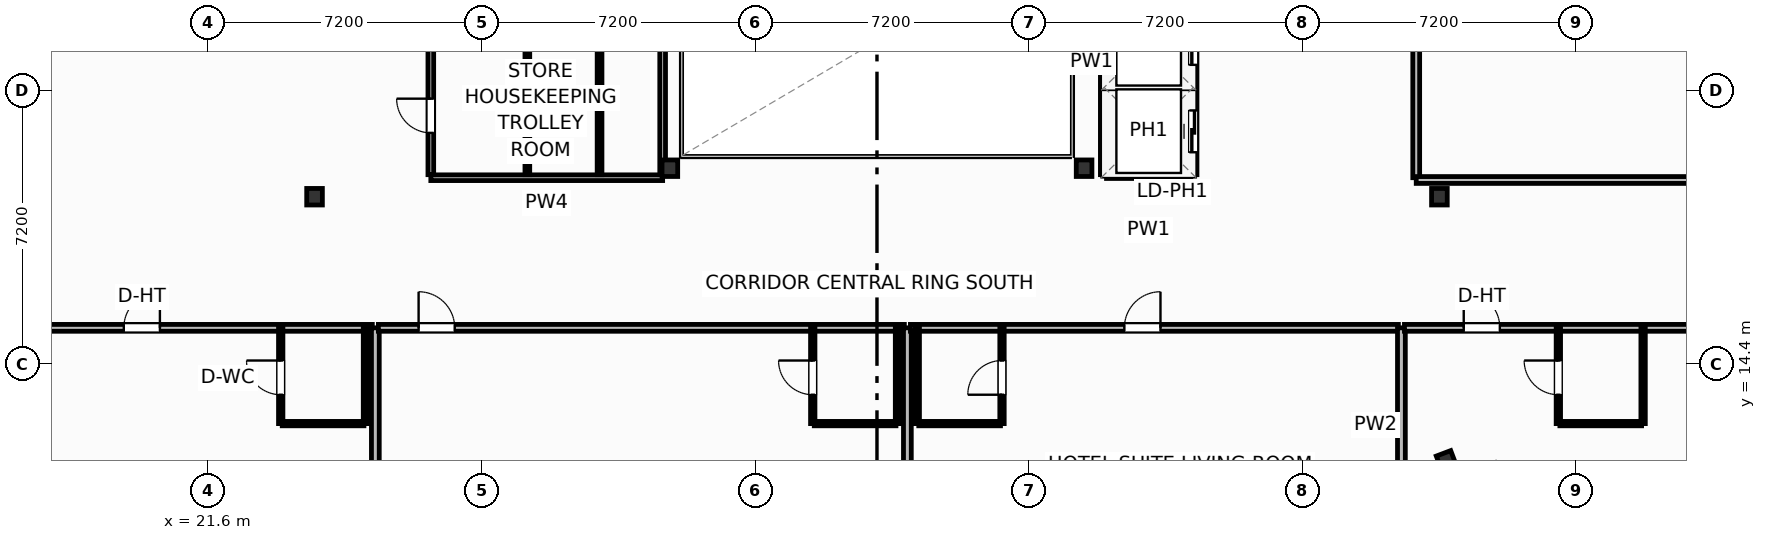
"""IFC4 building model, lengths in metres.
Left out: names, types, materials, properties, quantities, classifications, styles, units other than length and angle.
Written with IfcOpenShell. Run it as: python <this file> out.ifc"""

import sys

from ifc_helpers import new_model, si_unit, direction, frame, frame_2d, origin, origin_2d, place, context, subcontext, project, spatial, rectangle, i_section, extrude, element, fill, save


model = new_model("IFC4")
c1 = context("Model", 3, precision=1e-05, world=origin(), true_north=direction((0.0, 1.0)))
c2 = subcontext(c1, "Body", "Model", "MODEL_VIEW")
j1 = project(units=[si_unit("LENGTHUNIT", "METRE"), si_unit("PLANEANGLEUNIT", "RADIAN")], contexts=[c1])
p1 = place(None, origin())
s1 = spatial("IfcSite", under=j1, at=p1, CompositionType="ELEMENT")
p2 = place(p1, origin())
s2 = spatial("IfcBuilding", under=s1, at=p2, CompositionType="ELEMENT")
p3 = place(p2, frame((0.0, 0.0, 249.7)))
s3 = spatial("IfcBuildingStorey", under=s2, at=p3, CompositionType="ELEMENT", Elevation=249.7)
for number, where, z_axis, x_axis in (
    (1, (33.75, 19.55, 0.0), (0.0, 0.0, 1.0), (1.0, 0.0, 0.0)),
    (2, (44.65, 19.55, 0.0), (0.0, 0.0, 1.0), (1.0, 0.0, 0.0)),
    (3, (24.4, 18.8, 0.0), (0.0, 0.0, 1.0), (1.0, 0.0, 0.0)),
    (4, (54.0, 18.8, 0.0), (0.0, 0.0, 1.0), (1.0, 0.0, 0.0)),
):
    element("IfcColumn", number, at=place(p3, frame(where, z_axis=z_axis, x_axis=x_axis)), inside=s3, PredefinedType="COLUMN", context=c2, shape_type="SweptSolid", body=[
        extrude(i_section(OverallWidth=0.412, OverallDepth=0.435, WebThickness=0.036, FlangeThickness=0.057, FilletRadius=0.025, at=origin_2d()), origin(), (0.0, 0.0, 1.0), 3.7),
    ])
p4 = place(p3, frame((54.181, 11.853, 0.0), z_axis=(0.0, 0.0, 1.0), x_axis=(0.935221751401, 0.354062530786, 0.0)))
e5 = element("IfcColumn", 5, at=p4, inside=s3, PredefinedType="COLUMN", context=c2, shape_type="SweptSolid", body=[
    extrude(i_section(OverallWidth=0.406, OverallDepth=0.416, WebThickness=0.03, FlangeThickness=0.048, FilletRadius=0.025, at=origin_2d()), origin(), (0.0, 0.0, 1.0), 3.7),
])
p5 = place(p3, frame((56.219, 9.845, 0.0), z_axis=(0.0, 0.0, 1.0), x_axis=(0.935225601791, 0.354052360188, 0.0)))
e6 = element("IfcWall", 6, at=p5, inside=s3, PredefinedType="SOLIDWALL", context=c2, shape_type="SweptSolid", body=[
    extrude(rectangle(XDim=17.647, YDim=0.22, at=frame_2d((8.824, 0.0))), origin(), (0.0, 0.0, 1.0), 2.66),
])
p6 = place(p5, frame((7.774, 0.0, 0.8)))
e7 = element("IfcOpeningElement", 7, at=p6, cuts=e6, PredefinedType="OPENING", context=c2, shape_type="SweptSolid", body=[
    extrude(rectangle(XDim=2.1, YDim=1.75, at=frame_2d((1.05, 0.875))), frame((0.0, 0.12, 0.0), z_axis=(0.0, -1.0, 0.0), x_axis=(1.0, 0.0, 0.0)), (0.0, 0.0, 1.0), 0.24),
])
p7 = place(p3, frame((7.764, 15.35, 0.0), z_axis=(0.0, 0.0, 1.0), x_axis=(1.0, 0.0, 0.0)))
e8 = element("IfcWall", 8, at=p7, inside=s3, PredefinedType="PARTITIONING", context=c2, shape_type="SweptSolid", body=[
    extrude(rectangle(XDim=18.156, YDim=0.18, at=frame_2d((9.078, 0.0))), origin(), (0.0, 0.0, 1.0), 3.38),
])
p8 = place(p7, frame((11.617, 0.0, 0.0)))
e9 = element("IfcOpeningElement", 9, at=p8, cuts=e8, PredefinedType="OPENING", context=c2, shape_type="SweptSolid", body=[
    extrude(rectangle(XDim=0.95, YDim=2.15, at=frame_2d((0.475, 1.075))), frame((0.0, 0.1, 0.0), z_axis=(0.0, -1.0, 0.0), x_axis=(1.0, 0.0, 0.0)), (0.0, 0.0, 1.0), 0.2),
])
p9 = place(p3, frame((23.55, 12.83, 0.0), z_axis=(0.0, 0.0, 1.0), x_axis=(1.0, 0.0, 0.0)))
e10 = element("IfcWall", 10, at=p9, inside=s3, PredefinedType="PARTITIONING", context=c2, shape_type="SweptSolid", body=[
    extrude(rectangle(XDim=2.15, YDim=0.115, at=frame_2d((1.075, 0.0))), origin(), (0.0, 0.0, 1.0), 3.38),
])
p10 = place(p3, frame((23.51, 12.83, 0.0), z_axis=(0.0, 0.0, 1.0), x_axis=(0.0, 1.0, 0.0)))
e11 = element("IfcWall", 11, at=p10, inside=s3, PredefinedType="PARTITIONING", context=c2, shape_type="SweptSolid", body=[
    extrude(rectangle(XDim=2.52, YDim=0.115, at=frame_2d((1.26, 0.0))), origin(), (0.0, 0.0, 1.0), 3.38),
])
p11 = place(p10, frame((0.76, 0.0, 0.0)))
e12 = element("IfcOpeningElement", 12, at=p11, cuts=e11, PredefinedType="OPENING", context=c2, shape_type="SweptSolid", body=[
    extrude(rectangle(XDim=0.9, YDim=2.05, at=frame_2d((0.45, 1.025))), frame((0.0, 0.067, 0.0), z_axis=(0.0, -1.0, 0.0), x_axis=(1.0, 0.0, 0.0)), (0.0, 0.0, 1.0), 0.135),
])
p12 = place(p3, frame((25.74, 12.83, 0.0), z_axis=(0.0, 0.0, 1.0), x_axis=(0.0, 1.0, 0.0)))
e13 = element("IfcWall", 13, at=p12, inside=s3, PredefinedType="PARTITIONING", context=c2, shape_type="SweptSolid", body=[
    extrude(rectangle(XDim=2.52, YDim=0.115, at=frame_2d((1.26, 0.0))), origin(), (0.0, 0.0, 1.0), 1.165),
])
p13 = place(p3, frame((26.0, -1.574, 0.0), z_axis=(0.0, 0.0, 1.0), x_axis=(0.0, 1.0, 0.0)))
e14 = element("IfcWall", 14, at=p13, inside=s3, PredefinedType="PARTITIONING", context=c2, shape_type="SweptSolid", body=[
    extrude(rectangle(XDim=16.925, YDim=0.205, at=frame_2d((8.462, 0.0))), origin(), (0.0, 0.0, 1.0), 1.165),
])
p14 = place(p3, frame((26.08, 15.35, 0.0), z_axis=(0.0, 0.0, 1.0), x_axis=(1.0, 0.0, 0.0)))
e15 = element("IfcWall", 15, at=p14, inside=s3, PredefinedType="PARTITIONING", context=c2, shape_type="SweptSolid", body=[
    extrude(rectangle(XDim=13.84, YDim=0.18, at=frame_2d((6.92, 0.0))), origin(), (0.0, 0.0, 1.0), 3.38),
])
p15 = place(p14, frame((1.058, 0.0, 0.0)))
e16 = element("IfcOpeningElement", 16, at=p15, cuts=e15, PredefinedType="OPENING", context=c2, shape_type="SweptSolid", body=[
    extrude(rectangle(XDim=0.95, YDim=2.15, at=frame_2d((0.475, 1.075))), frame((0.0, 0.1, 0.0), z_axis=(0.0, -1.0, 0.0), x_axis=(1.0, 0.0, 0.0)), (0.0, 0.0, 1.0), 0.2),
])
p16 = place(p3, frame((37.55, 12.83, 0.0), z_axis=(0.0, 0.0, 1.0), x_axis=(1.0, 0.0, 0.0)))
e17 = element("IfcWall", 17, at=p16, inside=s3, PredefinedType="PARTITIONING", context=c2, shape_type="SweptSolid", body=[
    extrude(rectangle(XDim=2.15, YDim=0.115, at=frame_2d((1.075, 0.0))), origin(), (0.0, 0.0, 1.0), 3.38),
])
p17 = place(p3, frame((37.51, 12.83, 0.0), z_axis=(0.0, 0.0, 1.0), x_axis=(0.0, 1.0, 0.0)))
e18 = element("IfcWall", 18, at=p17, inside=s3, PredefinedType="PARTITIONING", context=c2, shape_type="SweptSolid", body=[
    extrude(rectangle(XDim=2.52, YDim=0.115, at=frame_2d((1.26, 0.0))), origin(), (0.0, 0.0, 1.0), 3.38),
])
p18 = place(p17, frame((0.76, 0.0, 0.0)))
e19 = element("IfcOpeningElement", 19, at=p18, cuts=e18, PredefinedType="OPENING", context=c2, shape_type="SweptSolid", body=[
    extrude(rectangle(XDim=0.9, YDim=2.05, at=frame_2d((0.45, 1.025))), frame((0.0, 0.067, 0.0), z_axis=(0.0, -1.0, 0.0), x_axis=(1.0, 0.0, 0.0)), (0.0, 0.0, 1.0), 0.135),
])
p19 = place(p3, frame((39.74, 12.83, 0.0), z_axis=(0.0, 0.0, 1.0), x_axis=(0.0, 1.0, 0.0)))
e20 = element("IfcWall", 20, at=p19, inside=s3, PredefinedType="PARTITIONING", context=c2, shape_type="SweptSolid", body=[
    extrude(rectangle(XDim=2.52, YDim=0.115, at=frame_2d((1.26, 0.0))), origin(), (0.0, 0.0, 1.0), 3.38),
])
p20 = place(p3, frame((40.0, 5.338, 0.0), z_axis=(0.0, 0.0, 1.0), x_axis=(0.0, 1.0, 0.0)))
e21 = element("IfcWall", 21, at=p20, inside=s3, PredefinedType="PARTITIONING", context=c2, shape_type="SweptSolid", body=[
    extrude(rectangle(XDim=10.012, YDim=0.205, at=frame_2d((5.006, 0.0))), origin(), (0.0, 0.0, 1.0), 3.38),
])
p21 = place(p3, frame((40.08, 15.35, 0.0), z_axis=(0.0, 0.0, 1.0), x_axis=(1.0, 0.0, 0.0)))
e22 = element("IfcWall", 22, at=p21, inside=s3, PredefinedType="PARTITIONING", context=c2, shape_type="SweptSolid", body=[
    extrude(rectangle(XDim=12.84, YDim=0.18, at=frame_2d((6.42, 0.0))), origin(), (0.0, 0.0, 1.0), 3.38),
])
p22 = place(p21, frame((5.63, 0.0, 0.0)))
e23 = element("IfcOpeningElement", 23, at=p22, cuts=e22, PredefinedType="OPENING", context=c2, shape_type="SweptSolid", body=[
    extrude(rectangle(XDim=0.95, YDim=2.15, at=frame_2d((0.475, 1.075))), frame((0.0, 0.1, 0.0), z_axis=(0.0, -1.0, 0.0), x_axis=(1.0, 0.0, 0.0)), (0.0, 0.0, 1.0), 0.2),
])
p23 = place(p3, frame((40.3, 12.83, 0.0), z_axis=(0.0, 0.0, 1.0), x_axis=(1.0, 0.0, 0.0)))
e24 = element("IfcWall", 24, at=p23, inside=s3, PredefinedType="PARTITIONING", context=c2, shape_type="SweptSolid", body=[
    extrude(rectangle(XDim=2.15, YDim=0.115, at=frame_2d((1.075, 0.0))), origin(), (0.0, 0.0, 1.0), 3.38),
])
p24 = place(p3, frame((42.49, 12.83, 0.0), z_axis=(0.0, 0.0, 1.0), x_axis=(0.0, 1.0, 0.0)))
e25 = element("IfcWall", 25, at=p24, inside=s3, PredefinedType="PARTITIONING", context=c2, shape_type="SweptSolid", body=[
    extrude(rectangle(XDim=2.52, YDim=0.115, at=frame_2d((1.26, 0.0))), origin(), (0.0, 0.0, 1.0), 3.38),
])
p25 = place(p24, frame((0.76, 0.0, 0.0)))
e26 = element("IfcOpeningElement", 26, at=p25, cuts=e25, PredefinedType="OPENING", context=c2, shape_type="SweptSolid", body=[
    extrude(rectangle(XDim=0.9, YDim=2.05, at=frame_2d((0.45, 1.025))), frame((0.0, 0.067, 0.0), z_axis=(0.0, -1.0, 0.0), x_axis=(1.0, 0.0, 0.0)), (0.0, 0.0, 1.0), 0.135),
])
p26 = place(p3, frame((40.26, 12.83, 0.0), z_axis=(0.0, 0.0, 1.0), x_axis=(0.0, 1.0, 0.0)))
e27 = element("IfcWall", 27, at=p26, inside=s3, PredefinedType="PARTITIONING", context=c2, shape_type="SweptSolid", body=[
    extrude(rectangle(XDim=2.52, YDim=0.115, at=frame_2d((1.26, 0.0))), origin(), (0.0, 0.0, 1.0), 3.38),
])
p27 = place(p3, frame((53.0, 10.26, 0.0), z_axis=(0.0, 0.0, 1.0), x_axis=(0.0, 1.0, 0.0)))
e28 = element("IfcWall", 28, at=p27, inside=s3, PredefinedType="PARTITIONING", context=c2, shape_type="SweptSolid", body=[
    extrude(rectangle(XDim=5.09, YDim=0.205, at=frame_2d((2.545, 0.0))), origin(), (0.0, 0.0, 1.0), 3.38),
])
p28 = place(p3, frame((53.08, 15.35, 0.0), z_axis=(0.0, 0.0, 1.0), x_axis=(1.0, 0.0, 0.0)))
e29 = element("IfcWall", 29, at=p28, inside=s3, PredefinedType="PARTITIONING", context=c2, shape_type="SweptSolid", body=[
    extrude(rectangle(XDim=17.624, YDim=0.18, at=frame_2d((8.812, 0.0))), origin(), (0.0, 0.0, 1.0), 3.38),
])
p29 = place(p28, frame((1.56, 0.0, 0.0)))
e30 = element("IfcOpeningElement", 30, at=p29, cuts=e29, PredefinedType="OPENING", context=c2, shape_type="SweptSolid", body=[
    extrude(rectangle(XDim=0.95, YDim=2.15, at=frame_2d((0.475, 1.075))), frame((0.0, 0.1, 0.0), z_axis=(0.0, -1.0, 0.0), x_axis=(1.0, 0.0, 0.0)), (0.0, 0.0, 1.0), 0.2),
])
p30 = place(p3, frame((57.17, 12.83, 0.0), z_axis=(0.0, 0.0, 1.0), x_axis=(1.0, 0.0, 0.0)))
e31 = element("IfcWall", 31, at=p30, inside=s3, PredefinedType="PARTITIONING", context=c2, shape_type="SweptSolid", body=[
    extrude(rectangle(XDim=2.15, YDim=0.115, at=frame_2d((1.075, 0.0))), origin(), (0.0, 0.0, 1.0), 3.38),
])
p31 = place(p3, frame((57.13, 12.83, 0.0), z_axis=(0.0, 0.0, 1.0), x_axis=(0.0, 1.0, 0.0)))
e32 = element("IfcWall", 32, at=p31, inside=s3, PredefinedType="PARTITIONING", context=c2, shape_type="SweptSolid", body=[
    extrude(rectangle(XDim=2.52, YDim=0.115, at=frame_2d((1.26, 0.0))), origin(), (0.0, 0.0, 1.0), 3.38),
])
p32 = place(p31, frame((0.76, 0.0, 0.0)))
e33 = element("IfcOpeningElement", 33, at=p32, cuts=e32, PredefinedType="OPENING", context=c2, shape_type="SweptSolid", body=[
    extrude(rectangle(XDim=0.9, YDim=2.05, at=frame_2d((0.45, 1.025))), frame((0.0, 0.067, 0.0), z_axis=(0.0, -1.0, 0.0), x_axis=(1.0, 0.0, 0.0)), (0.0, 0.0, 1.0), 0.135),
])
p33 = place(p3, frame((59.36, 12.83, 0.0), z_axis=(0.0, 0.0, 1.0), x_axis=(0.0, 1.0, 0.0)))
e34 = element("IfcWall", 34, at=p33, inside=s3, PredefinedType="PARTITIONING", context=c2, shape_type="SweptSolid", body=[
    extrude(rectangle(XDim=2.52, YDim=0.115, at=frame_2d((1.26, 0.0))), origin(), (0.0, 0.0, 1.0), 3.38),
])
p34 = place(p3, frame((53.39, 19.3, 0.0), z_axis=(0.0, 0.0, 1.0), x_axis=(0.0, 1.0, 0.0)))
e35 = element("IfcWall", 35, at=p34, inside=s3, PredefinedType="PARTITIONING", context=c2, shape_type="SweptSolid", body=[
    extrude(rectangle(XDim=8.07, YDim=0.18, at=frame_2d((4.035, 0.0))), origin(), (0.0, 0.0, 1.0), 3.38),
])
p35 = place(p34, frame((6.8, 0.0, 0.0)))
e36 = element("IfcOpeningElement", 36, at=p35, cuts=e35, PredefinedType="OPENING", context=c2, shape_type="SweptSolid", body=[
    extrude(rectangle(XDim=0.92, YDim=2.05, at=frame_2d((0.46, 1.025))), frame((0.0, 0.1, 0.0), z_axis=(0.0, -1.0, 0.0), x_axis=(1.0, 0.0, 0.0)), (0.0, 0.0, 1.0), 0.2),
])
p36 = place(p3, frame((53.39, 19.24, 0.0), z_axis=(0.0, 0.0, 1.0), x_axis=(1.0, 0.0, 0.0)))
e37 = element("IfcWall", 37, at=p36, inside=s3, PredefinedType="PARTITIONING", context=c2, shape_type="SweptSolid", body=[
    extrude(rectangle(XDim=22.217, YDim=0.18, at=frame_2d((11.108, 0.0))), origin(), (0.0, 0.0, 1.0), 1.165),
])
p37 = place(p3, frame((27.46, 19.3, 0.0), z_axis=(0.0, 0.0, 1.0), x_axis=(1.0, 0.0, 0.0)))
e38 = element("IfcWall", 38, at=p37, inside=s3, PredefinedType="PARTITIONING", context=c2, shape_type="SweptSolid", body=[
    extrude(rectangle(XDim=6.1, YDim=0.15, at=frame_2d((3.05, 0.0))), origin(), (0.0, 0.0, 1.0), 2.592),
])
for number, where, z_axis, x_axis in (
    (39, (30.0, 19.38, 0.0), (0.0, 0.0, 1.0), (0.0, 1.0, 0.0)),
    (40, (31.9, 19.38, 0.0), (0.0, 0.0, 1.0), (0.0, 1.0, 0.0)),
):
    element("IfcWall", number, at=place(p3, frame(where, z_axis=z_axis, x_axis=x_axis)), inside=s3, PredefinedType="PARTITIONING", context=c2, shape_type="SweptSolid", body=[
        extrude(rectangle(XDim=3.82, YDim=0.125, at=frame_2d((1.91, 0.0))), origin(), (0.0, 0.0, 1.0), 3.38),
    ])
p38 = place(p3, frame((27.46, 19.38, 0.0), z_axis=(0.0, 0.0, 1.0), x_axis=(0.0, 1.0, 0.0)))
e41 = element("IfcWall", 41, at=p38, inside=s3, PredefinedType="PARTITIONING", context=c2, shape_type="SweptSolid", body=[
    extrude(rectangle(XDim=7.16, YDim=0.15, at=frame_2d((3.58, 0.0))), origin(), (0.0, 0.0, 1.0), 3.38),
])
p39 = place(p38, frame((1.1, 0.0, 0.0)))
e42 = element("IfcOpeningElement", 42, at=p39, cuts=e41, PredefinedType="OPENING", context=c2, shape_type="SweptSolid", body=[
    extrude(rectangle(XDim=0.9, YDim=2.05, at=frame_2d((0.45, 1.025))), frame((0.0, 0.085, 0.0), z_axis=(0.0, -1.0, 0.0), x_axis=(1.0, 0.0, 0.0)), (0.0, 0.0, 1.0), 0.17),
])
p40 = place(p3, frame((33.56, 19.38, 0.0), z_axis=(0.0, 0.0, 1.0), x_axis=(0.0, 1.0, 0.0)))
e43 = element("IfcWall", 43, at=p40, inside=s3, PredefinedType="PARTITIONING", context=c2, shape_type="SweptSolid", body=[
    extrude(rectangle(XDim=7.16, YDim=0.15, at=frame_2d((3.58, 0.0))), origin(), (0.0, 0.0, 1.0), 2.754),
])
p41 = place(p3, frame((45.24, 21.675, 0.0), z_axis=(0.0, 0.0, 1.0), x_axis=(1.0, 0.0, 0.0)))
e44 = element("IfcWall", 44, at=p41, inside=s3, PredefinedType="PARTITIONING", context=c2, shape_type="SweptSolid", body=[
    extrude(rectangle(XDim=2.22, YDim=0.2, at=frame_2d((1.11, 0.0))), origin(), (0.0, 0.0, 1.0), 3.38),
])
p42 = place(p3, frame((45.24, 19.38, 0.0), z_axis=(0.0, 0.0, 1.0), x_axis=(1.0, 0.0, 0.0)))
e45 = element("IfcWall", 45, at=p42, inside=s3, PredefinedType="PARTITIONING", context=c2, shape_type="SweptSolid", body=[
    extrude(rectangle(XDim=2.22, YDim=0.2, at=frame_2d((1.11, 0.0))), origin(), (0.0, 0.0, 1.0), 2.592),
])
p43 = place(p3, frame((45.18, 19.38, 0.0), z_axis=(0.0, 0.0, 1.0), x_axis=(0.0, 1.0, 0.0)))
e46 = element("IfcWall", 46, at=p43, inside=s3, PredefinedType="PARTITIONING", context=c2, shape_type="SweptSolid", body=[
    extrude(rectangle(XDim=6.9, YDim=0.2, at=frame_2d((3.45, 0.0))), origin(), (0.0, 0.0, 1.0), 3.38),
])
p44 = place(p3, frame((47.52, 19.38, 0.0), z_axis=(0.0, 0.0, 1.0), x_axis=(0.0, 1.0, 0.0)))
e47 = element("IfcWall", 47, at=p44, inside=s3, PredefinedType="PARTITIONING", context=c2, shape_type="SweptSolid", body=[
    extrude(rectangle(XDim=6.9, YDim=0.2, at=frame_2d((3.45, 0.0))), origin(), (0.0, 0.0, 1.0), 3.38),
])
p45 = place(p44, frame((0.59, 0.0, 0.0)))
e48 = element("IfcOpeningElement", 48, at=p45, cuts=e47, PredefinedType="OPENING", context=c2, shape_type="SweptSolid", body=[
    extrude(rectangle(XDim=1.1, YDim=2.15, at=frame_2d((0.55, 1.075))), frame((0.0, 0.11, 0.0), z_axis=(0.0, -1.0, 0.0), x_axis=(1.0, 0.0, 0.0)), (0.0, 0.0, 1.0), 0.22),
])
p46 = place(p44, frame((2.89, 0.0, 0.0)))
e49 = element("IfcOpeningElement", 49, at=p46, cuts=e47, PredefinedType="OPENING", context=c2, shape_type="SweptSolid", body=[
    extrude(rectangle(XDim=1.1, YDim=2.15, at=frame_2d((0.55, 1.075))), frame((0.0, 0.11, 0.0), z_axis=(0.0, -1.0, 0.0), x_axis=(1.0, 0.0, 0.0)), (0.0, 0.0, 1.0), 0.22),
])
p47 = place(p44, frame((5.19, 0.0, 0.0)))
e50 = element("IfcOpeningElement", 50, at=p47, cuts=e47, PredefinedType="OPENING", context=c2, shape_type="SweptSolid", body=[
    extrude(rectangle(XDim=1.1, YDim=2.15, at=frame_2d((0.55, 1.075))), frame((0.0, 0.11, 0.0), z_axis=(0.0, -1.0, 0.0), x_axis=(1.0, 0.0, 0.0)), (0.0, 0.0, 1.0), 0.22),
])
p48 = place(p8, origin())
e51 = element("IfcDoor", 51, at=p48, inside=s3, OperationType="SINGLE_SWING_RIGHT", PredefinedType="DOOR", context=c2, shape_type="SweptSolid", body=[
    extrude(rectangle(XDim=0.95, YDim=2.15, at=frame_2d((0.475, 1.075))), frame((0.0, 0.025, 0.0), z_axis=(0.0, -1.0, 0.0), x_axis=(1.0, 0.0, 0.0)), (0.0, 0.0, 1.0), 0.05),
])
fill(e9, e51)
p49 = place(p11, origin())
e52 = element("IfcDoor", 52, at=p49, inside=s3, OperationType="SINGLE_SWING_RIGHT", PredefinedType="DOOR", context=c2, shape_type="SweptSolid", body=[
    extrude(rectangle(XDim=0.9, YDim=2.05, at=frame_2d((0.45, 1.025))), frame((0.0, 0.025, 0.0), z_axis=(0.0, -1.0, 0.0), x_axis=(1.0, 0.0, 0.0)), (0.0, 0.0, 1.0), 0.05),
])
fill(e12, e52)
p50 = place(p15, origin())
e53 = element("IfcDoor", 53, at=p50, inside=s3, OperationType="SINGLE_SWING_LEFT", PredefinedType="DOOR", context=c2, shape_type="SweptSolid", body=[
    extrude(rectangle(XDim=0.95, YDim=2.15, at=frame_2d((0.475, 1.075))), frame((0.0, 0.025, 0.0), z_axis=(0.0, -1.0, 0.0), x_axis=(1.0, 0.0, 0.0)), (0.0, 0.0, 1.0), 0.05),
])
fill(e16, e53)
p51 = place(p18, origin())
e54 = element("IfcDoor", 54, at=p51, inside=s3, OperationType="SINGLE_SWING_RIGHT", PredefinedType="DOOR", context=c2, shape_type="SweptSolid", body=[
    extrude(rectangle(XDim=0.9, YDim=2.05, at=frame_2d((0.45, 1.025))), frame((0.0, 0.025, 0.0), z_axis=(0.0, -1.0, 0.0), x_axis=(1.0, 0.0, 0.0)), (0.0, 0.0, 1.0), 0.05),
])
fill(e19, e54)
p52 = place(p22, origin())
e55 = element("IfcDoor", 55, at=p52, inside=s3, OperationType="SINGLE_SWING_RIGHT", PredefinedType="DOOR", context=c2, shape_type="SweptSolid", body=[
    extrude(rectangle(XDim=0.95, YDim=2.15, at=frame_2d((0.475, 1.075))), frame((0.0, 0.025, 0.0), z_axis=(0.0, -1.0, 0.0), x_axis=(1.0, 0.0, 0.0)), (0.0, 0.0, 1.0), 0.05),
])
fill(e23, e55)
p53 = place(p25, origin())
e56 = element("IfcDoor", 56, at=p53, inside=s3, OperationType="SINGLE_SWING_LEFT", PredefinedType="DOOR", context=c2, shape_type="SweptSolid", body=[
    extrude(rectangle(XDim=0.9, YDim=2.05, at=frame_2d((0.45, 1.025))), frame((0.0, 0.025, 0.0), z_axis=(0.0, -1.0, 0.0), x_axis=(1.0, 0.0, 0.0)), (0.0, 0.0, 1.0), 0.05),
])
fill(e26, e56)
p54 = place(p29, origin())
e57 = element("IfcDoor", 57, at=p54, inside=s3, OperationType="SINGLE_SWING_LEFT", PredefinedType="DOOR", context=c2, shape_type="SweptSolid", body=[
    extrude(rectangle(XDim=0.95, YDim=2.15, at=frame_2d((0.475, 1.075))), frame((0.0, 0.025, 0.0), z_axis=(0.0, -1.0, 0.0), x_axis=(1.0, 0.0, 0.0)), (0.0, 0.0, 1.0), 0.05),
])
fill(e30, e57)
p55 = place(p32, origin())
e58 = element("IfcDoor", 58, at=p55, inside=s3, OperationType="SINGLE_SWING_RIGHT", PredefinedType="DOOR", context=c2, shape_type="SweptSolid", body=[
    extrude(rectangle(XDim=0.9, YDim=2.05, at=frame_2d((0.45, 1.025))), frame((0.0, 0.025, 0.0), z_axis=(0.0, -1.0, 0.0), x_axis=(1.0, 0.0, 0.0)), (0.0, 0.0, 1.0), 0.05),
])
fill(e33, e58)
p56 = place(p39, origin())
e59 = element("IfcDoor", 59, at=p56, inside=s3, OperationType="SINGLE_SWING_RIGHT", PredefinedType="DOOR", context=c2, shape_type="SweptSolid", body=[
    extrude(rectangle(XDim=0.9, YDim=2.05, at=frame_2d((0.45, 1.025))), frame((0.0, 0.025, 0.0), z_axis=(0.0, -1.0, 0.0), x_axis=(1.0, 0.0, 0.0)), (0.0, 0.0, 1.0), 0.05),
])
fill(e42, e59)
p57 = place(p45, origin())
e60 = element("IfcDoor", 60, at=p57, inside=s3, OperationType="SLIDING_TO_LEFT", PredefinedType="DOOR", context=c2, shape_type="SweptSolid", body=[
    extrude(rectangle(XDim=1.1, YDim=2.15, at=frame_2d((0.55, 1.075))), frame((0.0, 0.025, 0.0), z_axis=(0.0, -1.0, 0.0), x_axis=(1.0, 0.0, 0.0)), (0.0, 0.0, 1.0), 0.05),
])
fill(e48, e60)
p58 = place(p46, origin())
e61 = element("IfcDoor", 61, at=p58, inside=s3, OperationType="SLIDING_TO_LEFT", PredefinedType="DOOR", context=c2, shape_type="SweptSolid", body=[
    extrude(rectangle(XDim=1.1, YDim=2.15, at=frame_2d((0.55, 1.075))), frame((0.0, 0.025, 0.0), z_axis=(0.0, -1.0, 0.0), x_axis=(1.0, 0.0, 0.0)), (0.0, 0.0, 1.0), 0.05),
])
fill(e49, e61)
save(model, sys.argv[1])
